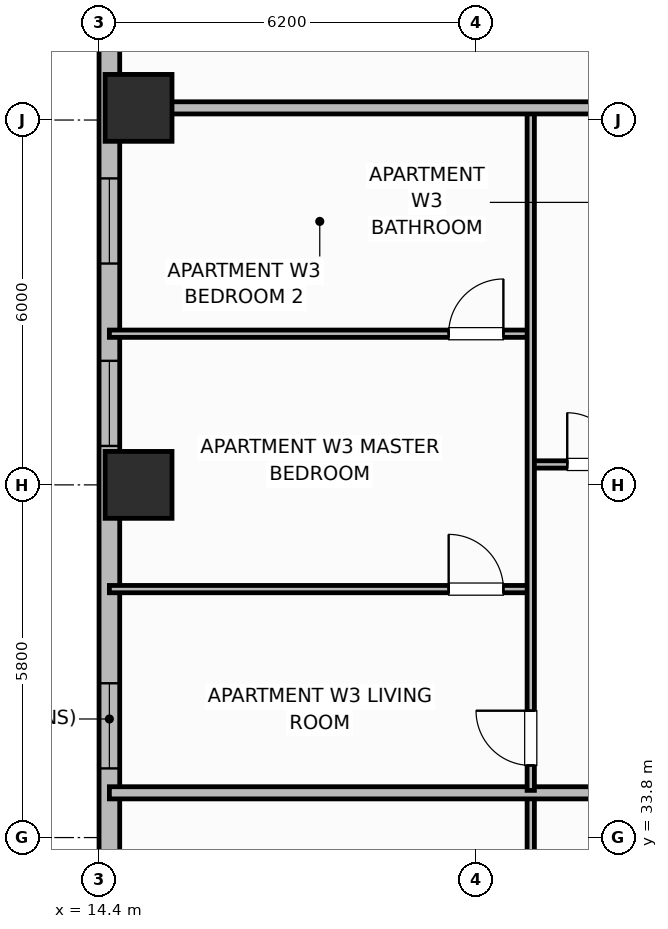
"""IFC4 building model, lengths in metres.
Left out: names, types, materials, properties, quantities, classifications, styles, units other than length and angle.
Written with IfcOpenShell. Run it as: python <this file> out.ifc"""

import sys

from ifc_helpers import new_model, si_unit, direction, frame, frame_2d, origin, origin_2d, place, context, subcontext, project, spatial, rectangle, extrude, element, fill, save


model = new_model("IFC4")
c1 = context("Model", 3, precision=1e-05, world=origin(), true_north=direction((0.0, 1.0)))
c2 = subcontext(c1, "Body", "Model", "MODEL_VIEW")
j1 = project(units=[si_unit("LENGTHUNIT", "METRE"), si_unit("PLANEANGLEUNIT", "RADIAN")], contexts=[c1])
p1 = place(None, origin())
s1 = spatial("IfcSite", under=j1, at=p1, CompositionType="ELEMENT")
p2 = place(p1, origin())
s2 = spatial("IfcBuilding", under=s1, at=p2, CompositionType="ELEMENT")
p3 = place(p2, frame((0.0, 0.0, 114.2)))
s3 = spatial("IfcBuildingStorey", under=s2, at=p3, CompositionType="ELEMENT", Elevation=114.2)
for number, where, z_axis, x_axis in (
    (1, (15.05, 39.6, 0.0), (0.0, 0.0, 1.0), (1.0, 0.0, 0.0)),
    (2, (15.05, 45.8, 0.0), (0.0, 0.0, 1.0), (1.0, 0.0, 0.0)),
):
    element("IfcColumn", number, at=place(p3, frame(where, z_axis=z_axis, x_axis=x_axis)), inside=s3, PredefinedType="COLUMN", context=c2, shape_type="SweptSolid", body=[
        extrude(rectangle(XDim=1.1, YDim=1.1, at=origin_2d()), origin(), (0.0, 0.0, 1.0), 3.7),
    ])
p4 = place(p3, frame((14.57, 47.4, 0.0), z_axis=(0.0, 0.0, 1.0), x_axis=(0.0, -1.0, 0.0)))
e3 = element("IfcWall", 3, at=p4, inside=s3, PredefinedType="SOLIDWALL", context=c2, shape_type="SweptSolid", body=[
    extrude(rectangle(XDim=14.8, YDim=0.34, at=frame_2d((7.4, 0.0))), origin(), (0.0, 0.0, 1.0), 2.7),
])
p5 = place(p4, frame((2.76, 0.0, 0.69)))
e4 = element("IfcOpeningElement", 4, at=p5, cuts=e3, PredefinedType="OPENING", context=c2, shape_type="SweptSolid", body=[
    extrude(rectangle(XDim=1.4, YDim=1.85, at=frame_2d((0.7, 0.925))), frame((0.0, 0.18, 0.0), z_axis=(0.0, -1.0, 0.0), x_axis=(1.0, 0.0, 0.0)), (0.0, 0.0, 1.0), 0.36),
])
p6 = place(p4, frame((5.76, 0.0, 0.69)))
e5 = element("IfcOpeningElement", 5, at=p6, cuts=e3, PredefinedType="OPENING", context=c2, shape_type="SweptSolid", body=[
    extrude(rectangle(XDim=1.4, YDim=1.85, at=frame_2d((0.7, 0.925))), frame((0.0, 0.18, 0.0), z_axis=(0.0, -1.0, 0.0), x_axis=(1.0, 0.0, 0.0)), (0.0, 0.0, 1.0), 0.36),
])
p7 = place(p4, frame((11.062, 0.0, 0.73)))
e6 = element("IfcOpeningElement", 6, at=p7, cuts=e3, PredefinedType="OPENING", context=c2, shape_type="SweptSolid", body=[
    extrude(rectangle(XDim=1.4, YDim=1.85, at=frame_2d((0.7, 0.925))), frame((0.0, 0.18, 0.0), z_axis=(0.0, -1.0, 0.0), x_axis=(1.0, 0.0, 0.0)), (0.0, 0.0, 1.0), 0.36),
])
p8 = place(p3, frame((21.5, 22.96, 0.0), z_axis=(0.0, 0.0, 1.0), x_axis=(0.0, 1.0, 0.0)))
e7 = element("IfcWall", 7, at=p8, inside=s3, PredefinedType="PARTITIONING", context=c2, shape_type="SweptSolid", body=[
    extrude(rectangle(XDim=11.536, YDim=0.12, at=frame_2d((5.768, 0.0))), origin(), (0.0, 0.0, 1.0), 2.53),
])
p9 = place(p8, frame((0.41, 0.0, 0.0)))
e8 = element("IfcOpeningElement", 8, at=p9, cuts=e7, PredefinedType="OPENING", context=c2, shape_type="SweptSolid", body=[
    extrude(rectangle(XDim=0.9, YDim=2.1, at=frame_2d((0.45, 1.05))), frame((0.0, 0.07, 0.0), z_axis=(0.0, -1.0, 0.0), x_axis=(1.0, 0.0, 0.0)), (0.0, 0.0, 1.0), 0.14),
])
p10 = place(p3, frame((14.57, 34.536, 0.0), z_axis=(0.0, 0.0, 1.0), x_axis=(1.0, 0.0, 0.0)))
e9 = element("IfcWall", 9, at=p10, inside=s3, PredefinedType="PARTITIONING", context=c2, shape_type="SweptSolid", body=[
    extrude(rectangle(XDim=9.18, YDim=0.2, at=frame_2d((4.59, 0.0))), origin(), (0.0, 0.0, 1.0), 2.53),
])
p11 = place(p3, frame((21.5, 39.936, 0.0), z_axis=(0.0, 0.0, 1.0), x_axis=(1.0, 0.0, 0.0)))
e10 = element("IfcWall", 10, at=p11, inside=s3, PredefinedType="PARTITIONING", context=c2, shape_type="SweptSolid", body=[
    extrude(rectangle(XDim=2.25, YDim=0.12, at=frame_2d((1.125, 0.0))), origin(), (0.0, 0.0, 1.0), 2.53),
])
p12 = place(p11, frame((0.6, 0.0, 0.0)))
e11 = element("IfcOpeningElement", 11, at=p12, cuts=e10, PredefinedType="OPENING", context=c2, shape_type="SweptSolid", body=[
    extrude(rectangle(XDim=0.85, YDim=2.1, at=frame_2d((0.425, 1.05))), frame((0.0, 0.07, 0.0), z_axis=(0.0, -1.0, 0.0), x_axis=(1.0, 0.0, 0.0)), (0.0, 0.0, 1.0), 0.14),
])
p13 = place(p3, frame((14.57, 37.886, 0.0), z_axis=(0.0, 0.0, 1.0), x_axis=(1.0, 0.0, 0.0)))
e12 = element("IfcWall", 12, at=p13, inside=s3, PredefinedType="PARTITIONING", context=c2, shape_type="SweptSolid", body=[
    extrude(rectangle(XDim=6.93, YDim=0.12, at=frame_2d((3.465, 0.0))), origin(), (0.0, 0.0, 1.0), 2.53),
])
p14 = place(p13, frame((5.58, 0.0, 0.0)))
e13 = element("IfcOpeningElement", 13, at=p14, cuts=e12, PredefinedType="OPENING", context=c2, shape_type="SweptSolid", body=[
    extrude(rectangle(XDim=0.9, YDim=2.1, at=frame_2d((0.45, 1.05))), frame((0.0, 0.07, 0.0), z_axis=(0.0, -1.0, 0.0), x_axis=(1.0, 0.0, 0.0)), (0.0, 0.0, 1.0), 0.14),
])
p15 = place(p3, frame((14.57, 42.086, 0.0), z_axis=(0.0, 0.0, 1.0), x_axis=(1.0, 0.0, 0.0)))
e14 = element("IfcWall", 14, at=p15, inside=s3, PredefinedType="PARTITIONING", context=c2, shape_type="SweptSolid", body=[
    extrude(rectangle(XDim=6.93, YDim=0.12, at=frame_2d((3.465, 0.0))), origin(), (0.0, 0.0, 1.0), 2.53),
])
p16 = place(p15, frame((5.58, 0.0, 0.0)))
e15 = element("IfcOpeningElement", 15, at=p16, cuts=e14, PredefinedType="OPENING", context=c2, shape_type="SweptSolid", body=[
    extrude(rectangle(XDim=0.9, YDim=2.1, at=frame_2d((0.45, 1.05))), frame((0.0, 0.07, 0.0), z_axis=(0.0, -1.0, 0.0), x_axis=(1.0, 0.0, 0.0)), (0.0, 0.0, 1.0), 0.14),
])
p17 = place(p3, frame((21.5, 34.576, 0.0), z_axis=(0.0, 0.0, 1.0), x_axis=(0.0, 1.0, 0.0)))
e16 = element("IfcWall", 16, at=p17, inside=s3, PredefinedType="PARTITIONING", context=c2, shape_type="SweptSolid", body=[
    extrude(rectangle(XDim=11.184, YDim=0.12, at=frame_2d((5.592, 0.0))), origin(), (0.0, 0.0, 1.0), 2.53),
])
p18 = place(p17, frame((0.41, 0.0, 0.0)))
e17 = element("IfcOpeningElement", 17, at=p18, cuts=e16, PredefinedType="OPENING", context=c2, shape_type="SweptSolid", body=[
    extrude(rectangle(XDim=0.9, YDim=2.1, at=frame_2d((0.45, 1.05))), frame((0.0, 0.07, 0.0), z_axis=(0.0, -1.0, 0.0), x_axis=(1.0, 0.0, 0.0)), (0.0, 0.0, 1.0), 0.14),
])
p19 = place(p3, frame((14.99, 45.8, 0.0), z_axis=(0.0, 0.0, 1.0), x_axis=(1.0, 0.0, 0.0)))
e18 = element("IfcWall", 18, at=p19, inside=s3, PredefinedType="PARTITIONING", context=c2, shape_type="SweptSolid", body=[
    extrude(rectangle(XDim=8.76, YDim=0.2, at=frame_2d((4.38, 0.0))), origin(), (0.0, 0.0, 1.0), 2.53),
])
p20 = place(p5, origin())
e19 = element("IfcWindow", 19, at=p20, inside=s3, PartitioningType="SINGLE_PANEL", PredefinedType="WINDOW", context=c2, shape_type="SweptSolid", body=[
    extrude(rectangle(XDim=1.4, YDim=1.85, at=frame_2d((0.7, 0.925))), frame((0.0, 0.03, 0.0), z_axis=(0.0, -1.0, 0.0), x_axis=(1.0, 0.0, 0.0)), (0.0, 0.0, 1.0), 0.06),
])
fill(e4, e19)
p21 = place(p6, origin())
e20 = element("IfcWindow", 20, at=p21, inside=s3, PartitioningType="SINGLE_PANEL", PredefinedType="WINDOW", context=c2, shape_type="SweptSolid", body=[
    extrude(rectangle(XDim=1.4, YDim=1.85, at=frame_2d((0.7, 0.925))), frame((0.0, 0.03, 0.0), z_axis=(0.0, -1.0, 0.0), x_axis=(1.0, 0.0, 0.0)), (0.0, 0.0, 1.0), 0.06),
])
fill(e5, e20)
p22 = place(p7, origin())
e21 = element("IfcWindow", 21, at=p22, inside=s3, PartitioningType="SINGLE_PANEL", PredefinedType="WINDOW", context=c2, shape_type="SweptSolid", body=[
    extrude(rectangle(XDim=1.4, YDim=1.85, at=frame_2d((0.7, 0.925))), frame((0.0, 0.03, 0.0), z_axis=(0.0, -1.0, 0.0), x_axis=(1.0, 0.0, 0.0)), (0.0, 0.0, 1.0), 0.06),
])
fill(e6, e21)
p23 = place(p12, origin())
e22 = element("IfcDoor", 22, at=p23, inside=s3, OperationType="SINGLE_SWING_LEFT", PredefinedType="DOOR", context=c2, shape_type="SweptSolid", body=[
    extrude(rectangle(XDim=0.85, YDim=2.1, at=frame_2d((0.425, 1.05))), frame((0.0, 0.025, 0.0), z_axis=(0.0, -1.0, 0.0), x_axis=(1.0, 0.0, 0.0)), (0.0, 0.0, 1.0), 0.05),
])
fill(e11, e22)
p24 = place(p14, origin())
e23 = element("IfcDoor", 23, at=p24, inside=s3, OperationType="SINGLE_SWING_LEFT", PredefinedType="DOOR", context=c2, shape_type="SweptSolid", body=[
    extrude(rectangle(XDim=0.9, YDim=2.1, at=frame_2d((0.45, 1.05))), frame((0.0, 0.025, 0.0), z_axis=(0.0, -1.0, 0.0), x_axis=(1.0, 0.0, 0.0)), (0.0, 0.0, 1.0), 0.05),
])
fill(e13, e23)
p25 = place(p16, origin())
e24 = element("IfcDoor", 24, at=p25, inside=s3, OperationType="SINGLE_SWING_RIGHT", PredefinedType="DOOR", context=c2, shape_type="SweptSolid", body=[
    extrude(rectangle(XDim=0.9, YDim=2.1, at=frame_2d((0.45, 1.05))), frame((0.0, 0.025, 0.0), z_axis=(0.0, -1.0, 0.0), x_axis=(1.0, 0.0, 0.0)), (0.0, 0.0, 1.0), 0.05),
])
fill(e15, e24)
p26 = place(p18, origin())
e25 = element("IfcDoor", 25, at=p26, inside=s3, OperationType="SINGLE_SWING_RIGHT", PredefinedType="DOOR", context=c2, shape_type="SweptSolid", body=[
    extrude(rectangle(XDim=0.9, YDim=2.1, at=frame_2d((0.45, 1.05))), frame((0.0, 0.025, 0.0), z_axis=(0.0, -1.0, 0.0), x_axis=(1.0, 0.0, 0.0)), (0.0, 0.0, 1.0), 0.05),
])
fill(e17, e25)
save(model, sys.argv[1])
